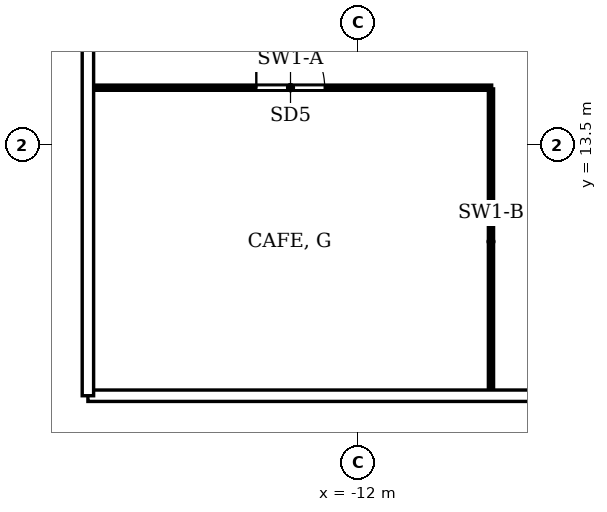
"""IFC4 building model, lengths in metres.
Left out: names, types, materials, properties, quantities, classifications, styles, units other than length and angle.
Written with IfcOpenShell. Run it as: python <this file> out.ifc"""

import sys

from ifc_helpers import new_model, si_unit, direction, frame, frame_2d, origin, place, context, subcontext, project, spatial, rectangle, extrude, element, fill, save


model = new_model("IFC4")
c1 = context("Model", 3, precision=1e-05, world=origin(), true_north=direction((0.0, 1.0)))
c2 = subcontext(c1, "Body", "Model", "MODEL_VIEW")
j1 = project(units=[si_unit("LENGTHUNIT", "METRE"), si_unit("PLANEANGLEUNIT", "RADIAN")], contexts=[c1])
p1 = place(None, origin())
s1 = spatial("IfcSite", under=j1, at=p1, CompositionType="ELEMENT")
p2 = place(p1, origin())
s2 = spatial("IfcBuilding", under=s1, at=p2, CompositionType="ELEMENT")
p3 = place(p2, origin())
s3 = spatial("IfcBuildingStorey", under=s2, at=p3, CompositionType="ELEMENT", Elevation=0.0)
p4 = place(p3, frame((-19.05, 15.0, 0.0), z_axis=(0.0, 0.0, 1.0), x_axis=(1.0, 0.0, 0.0)))
e1 = element("IfcWall", 1, at=p4, inside=s3, PredefinedType="PARTITIONING", context=c2, shape_type="SweptSolid", body=[
    extrude(rectangle(XDim=10.55, YDim=0.1, at=frame_2d((5.275, 0.0))), origin(), (0.0, 0.0, 1.0), 8.24),
])
p5 = place(p4, frame((4.375, 0.0, 0.0)))
e2 = element("IfcOpeningElement", 2, at=p5, cuts=e1, PredefinedType="OPENING", context=c2, shape_type="SweptSolid", body=[
    extrude(rectangle(XDim=1.8, YDim=2.4, at=frame_2d((0.9, 1.2))), frame((0.0, 0.06, 0.0), z_axis=(0.0, -1.0, 0.0), x_axis=(1.0, 0.0, 0.0)), (0.0, 0.0, 1.0), 0.12),
])
p6 = place(p3, frame((-8.5, 14.95, 0.0), z_axis=(0.0, 0.0, 1.0), x_axis=(0.0, -1.0, 0.0)))
e3 = element("IfcWall", 3, at=p6, inside=s3, PredefinedType="PARTITIONING", context=c2, shape_type="SweptSolid", body=[
    extrude(rectangle(XDim=8.0, YDim=0.1, at=frame_2d((4.0, 0.0))), origin(), (0.0, 0.0, 1.0), 8.87),
])
p7 = place(p5, origin())
e4 = element("IfcDoor", 4, at=p7, inside=s3, OperationType="DOUBLE_DOOR_SINGLE_SWING", PredefinedType="DOOR", context=c2, shape_type="SweptSolid", body=[
    extrude(rectangle(XDim=1.8, YDim=2.4, at=frame_2d((0.9, 1.2))), frame((0.0, 0.025, 0.0), z_axis=(0.0, -1.0, 0.0), x_axis=(1.0, 0.0, 0.0)), (0.0, 0.0, 1.0), 0.05),
])
fill(e2, e4)
save(model, sys.argv[1])
